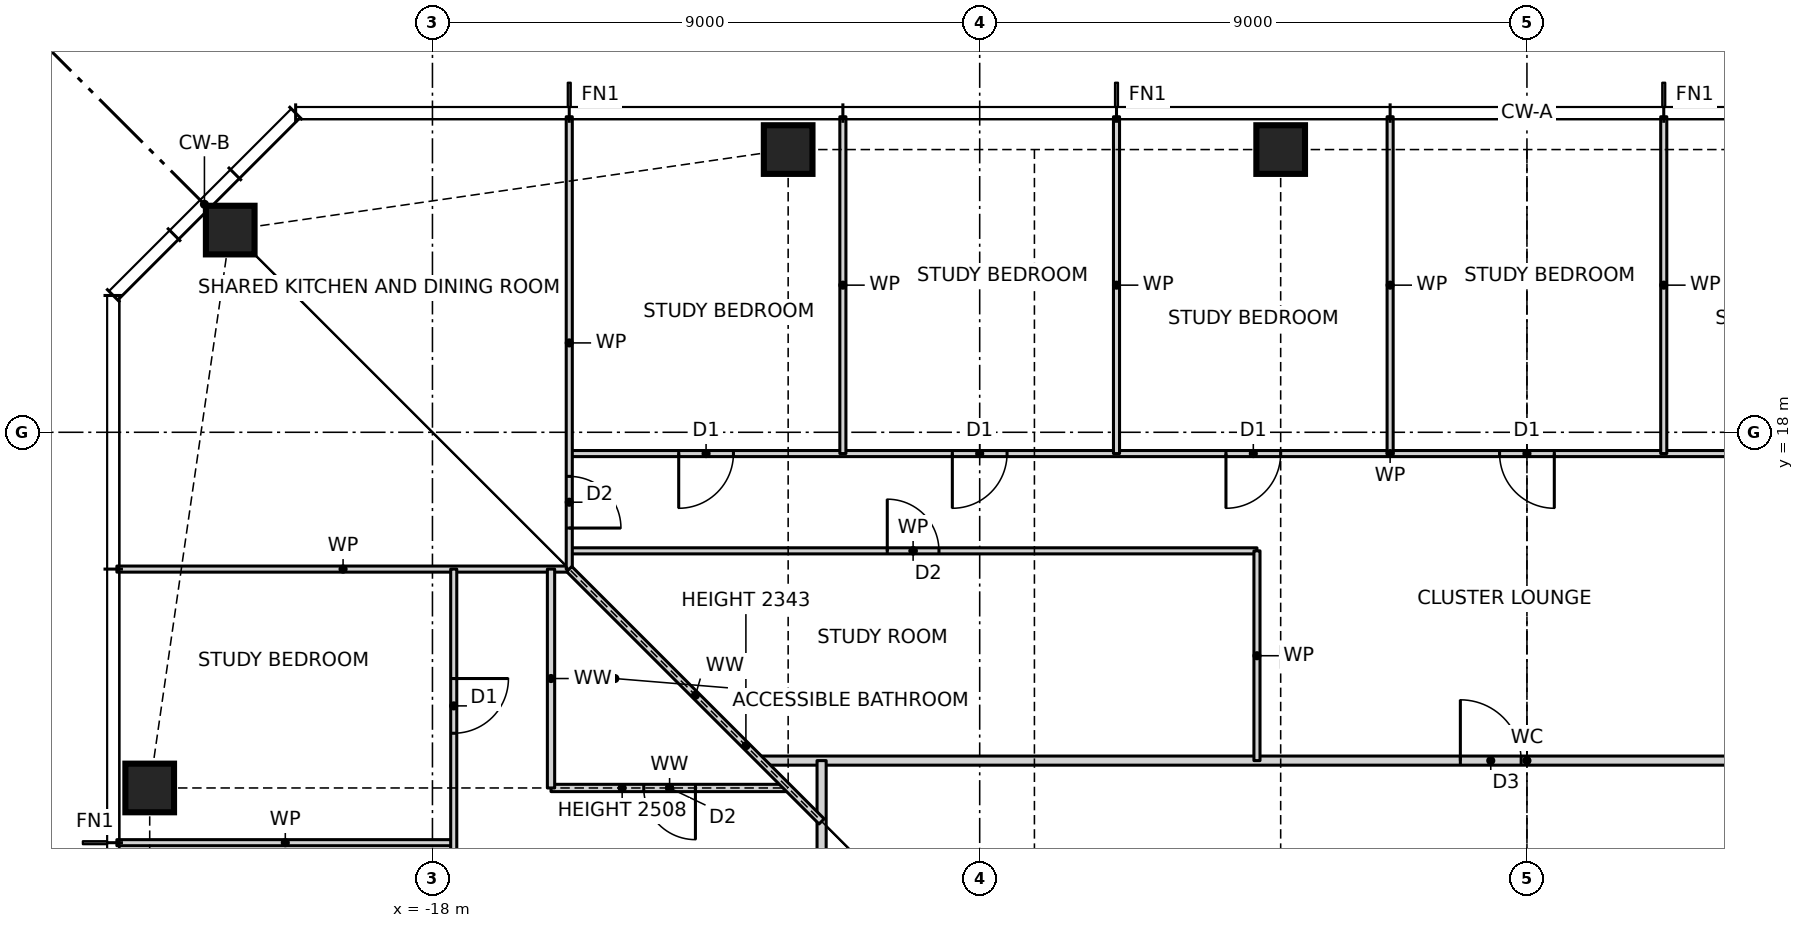
"""IFC4 building model, lengths in metres.
Left out: names, types, materials, properties, quantities, classifications, styles, units other than length and angle.
Written with IfcOpenShell. Run it as: python <this file> out.ifc"""

import sys

from ifc_helpers import new_model, si_unit, direction, frame, frame_2d, origin, origin_2d, place, context, subcontext, project, spatial, rectangle, hollow_rectangle, extrude, element, fill, save


model = new_model("IFC4")
c1 = context("Model", 3, precision=1e-05, world=origin(), true_north=direction((0.0, 1.0)))
c2 = subcontext(c1, "Body", "Model", "MODEL_VIEW")
j1 = project(units=[si_unit("LENGTHUNIT", "METRE"), si_unit("PLANEANGLEUNIT", "RADIAN")], contexts=[c1])
p1 = place(None, origin())
s1 = spatial("IfcSite", under=j1, at=p1, CompositionType="ELEMENT")
p2 = place(p1, origin())
s2 = spatial("IfcBuilding", under=s1, at=p2, CompositionType="ELEMENT")
p3 = place(p2, frame((0.0, 0.0, 60.5)))
s3 = spatial("IfcBuildingStorey", under=s2, at=p3, CompositionType="ELEMENT", Elevation=60.5)
for number, where, z_axis, x_axis in (
    (1, (-4.05, 22.65, 0.0), (0.0, 0.0, 1.0), (1.0, 0.0, 0.0)),
    (2, (-12.15, 22.65, 0.0), (0.0, 0.0, 1.0), (1.0, 0.0, 0.0)),
    (3, (-21.326, 21.326, 0.0), (0.0, 0.0, 1.0), (1.0, 0.0, 0.0)),
    (4, (-22.65, 12.15, 0.0), (0.0, 0.0, 1.0), (1.0, 0.0, 0.0)),
):
    element("IfcColumn", number, at=place(p3, frame(where, z_axis=z_axis, x_axis=x_axis)), inside=s3, PredefinedType="COLUMN", context=c2, shape_type="SweptSolid", body=[
        extrude(hollow_rectangle(XDim=0.8, YDim=0.8, WallThickness=0.09, at=origin_2d()), origin(), (0.0, 0.0, 1.0), 3.5),
    ])
p4 = place(p3, frame((-23.19, 11.25, 0.0), z_axis=(0.0, 0.0, 1.0), x_axis=(1.0, 0.0, 0.0)))
e5 = element("IfcWall", 5, at=p4, inside=s3, PredefinedType="PARTITIONING", context=c2, shape_type="SweptSolid", body=[
    extrude(rectangle(XDim=5.54, YDim=0.1, at=frame_2d((2.77, 0.0))), origin(), (0.0, 0.0, 1.0), 3.27),
])
p5 = place(p3, frame((-16.05, 12.15, 0.0), z_axis=(0.0, 0.0, 1.0), x_axis=(1.0, 0.0, 0.0)))
e6 = element("IfcWall", 6, at=p5, inside=s3, PredefinedType="PARTITIONING", context=c2, shape_type="SweptSolid", body=[
    extrude(rectangle(XDim=3.9, YDim=0.12, at=frame_2d((1.95, 0.0))), origin(), (0.0, 0.0, 1.0), 2.508),
])
p6 = place(p5, frame((1.525, 0.0, 0.0)))
e7 = element("IfcOpeningElement", 7, at=p6, cuts=e6, PredefinedType="OPENING", context=c2, shape_type="SweptSolid", body=[
    extrude(rectangle(XDim=0.85, YDim=2.1, at=frame_2d((0.425, 1.05))), frame((0.0, 0.07, 0.0), z_axis=(0.0, -1.0, 0.0), x_axis=(1.0, 0.0, 0.0)), (0.0, 0.0, 1.0), 0.14),
])
p7 = place(p3, frame((-12.6, 12.6, 0.0), z_axis=(0.0, 0.0, 1.0), x_axis=(1.0, 0.0, 0.0)))
e8 = element("IfcWall", 8, at=p7, inside=s3, PredefinedType="PARTITIONING", context=c2, shape_type="SweptSolid", body=[
    extrude(rectangle(XDim=25.2, YDim=0.15, at=frame_2d((12.6, 0.0))), origin(), (0.0, 0.0, 1.0), 3.27),
])
p8 = place(p7, frame((11.505, 0.0, 0.0)))
e9 = element("IfcOpeningElement", 9, at=p8, cuts=e8, PredefinedType="OPENING", context=c2, shape_type="SweptSolid", body=[
    extrude(rectangle(XDim=1.0, YDim=2.1, at=frame_2d((0.5, 1.05))), frame((0.0, 0.085, 0.0), z_axis=(0.0, -1.0, 0.0), x_axis=(1.0, 0.0, 0.0)), (0.0, 0.0, 1.0), 0.17),
])
p9 = place(p3, frame((-23.19, 15.75, 0.0), z_axis=(0.0, 0.0, 1.0), x_axis=(1.0, 0.0, 0.0)))
e10 = element("IfcWall", 10, at=p9, inside=s3, PredefinedType="PARTITIONING", context=c2, shape_type="SweptSolid", body=[
    extrude(rectangle(XDim=7.44, YDim=0.1, at=frame_2d((3.72, 0.0))), origin(), (0.0, 0.0, 1.0), 3.27),
])
p10 = place(p3, frame((-15.75, 16.05, 0.0), z_axis=(0.0, 0.0, 1.0), x_axis=(1.0, 0.0, 0.0)))
e11 = element("IfcWall", 11, at=p10, inside=s3, PredefinedType="PARTITIONING", context=c2, shape_type="SweptSolid", body=[
    extrude(rectangle(XDim=11.31, YDim=0.1, at=frame_2d((5.655, 0.0))), origin(), (0.0, 0.0, 1.0), 3.27),
])
p11 = place(p10, frame((5.23, 0.0, 0.0)))
e12 = element("IfcOpeningElement", 12, at=p11, cuts=e11, PredefinedType="OPENING", context=c2, shape_type="SweptSolid", body=[
    extrude(rectangle(XDim=0.85, YDim=2.1, at=frame_2d((0.425, 1.05))), frame((0.0, 0.06, 0.0), z_axis=(0.0, -1.0, 0.0), x_axis=(1.0, 0.0, 0.0)), (0.0, 0.0, 1.0), 0.12),
])
p12 = place(p3, frame((-15.75, 17.65, 0.0), z_axis=(0.0, 0.0, 1.0), x_axis=(1.0, 0.0, 0.0)))
e13 = element("IfcWall", 13, at=p12, inside=s3, PredefinedType="PARTITIONING", context=c2, shape_type="SweptSolid", body=[
    extrude(rectangle(XDim=27.0, YDim=0.1, at=frame_2d((13.5, 0.0))), origin(), (0.0, 0.0, 1.0), 3.27),
])
p13 = place(p12, frame((24.3, 0.0, 0.0)))
e14 = element("IfcOpeningElement", 14, at=p13, cuts=e13, PredefinedType="OPENING", context=c2, shape_type="SweptSolid", body=[
    extrude(rectangle(XDim=0.9, YDim=2.1, at=frame_2d((0.45, 1.05))), frame((0.0, 0.06, 0.0), z_axis=(0.0, -1.0, 0.0), x_axis=(1.0, 0.0, 0.0)), (0.0, 0.0, 1.0), 0.12),
])
p14 = place(p12, frame((19.8, 0.0, 0.0)))
e15 = element("IfcOpeningElement", 15, at=p14, cuts=e13, PredefinedType="OPENING", context=c2, shape_type="SweptSolid", body=[
    extrude(rectangle(XDim=0.9, YDim=2.1, at=frame_2d((0.45, 1.05))), frame((0.0, 0.06, 0.0), z_axis=(0.0, -1.0, 0.0), x_axis=(1.0, 0.0, 0.0)), (0.0, 0.0, 1.0), 0.12),
])
p15 = place(p12, frame((15.3, 0.0, 0.0)))
e16 = element("IfcOpeningElement", 16, at=p15, cuts=e13, PredefinedType="OPENING", context=c2, shape_type="SweptSolid", body=[
    extrude(rectangle(XDim=0.9, YDim=2.1, at=frame_2d((0.45, 1.05))), frame((0.0, 0.06, 0.0), z_axis=(0.0, -1.0, 0.0), x_axis=(1.0, 0.0, 0.0)), (0.0, 0.0, 1.0), 0.12),
])
p16 = place(p12, frame((10.8, 0.0, 0.0)))
e17 = element("IfcOpeningElement", 17, at=p16, cuts=e13, PredefinedType="OPENING", context=c2, shape_type="SweptSolid", body=[
    extrude(rectangle(XDim=0.9, YDim=2.1, at=frame_2d((0.45, 1.05))), frame((0.0, 0.06, 0.0), z_axis=(0.0, -1.0, 0.0), x_axis=(1.0, 0.0, 0.0)), (0.0, 0.0, 1.0), 0.12),
])
p17 = place(p12, frame((6.3, 0.0, 0.0)))
e18 = element("IfcOpeningElement", 18, at=p17, cuts=e13, PredefinedType="OPENING", context=c2, shape_type="SweptSolid", body=[
    extrude(rectangle(XDim=0.9, YDim=2.1, at=frame_2d((0.45, 1.05))), frame((0.0, 0.06, 0.0), z_axis=(0.0, -1.0, 0.0), x_axis=(1.0, 0.0, 0.0)), (0.0, 0.0, 1.0), 0.12),
])
p18 = place(p12, frame((1.8, 0.0, 0.0)))
e19 = element("IfcOpeningElement", 19, at=p18, cuts=e13, PredefinedType="OPENING", context=c2, shape_type="SweptSolid", body=[
    extrude(rectangle(XDim=0.9, YDim=2.1, at=frame_2d((0.45, 1.05))), frame((0.0, 0.06, 0.0), z_axis=(0.0, -1.0, 0.0), x_axis=(1.0, 0.0, 0.0)), (0.0, 0.0, 1.0), 0.12),
])
for number, where, z_axis, x_axis in (
    (20, (2.25, 17.65, 0.0), (0.0, 0.0, 1.0), (0.0, 1.0, 0.0)),
    (21, (-2.25, 17.65, 0.0), (0.0, 0.0, 1.0), (0.0, 1.0, 0.0)),
):
    element("IfcWall", number, at=place(p3, frame(where, z_axis=z_axis, x_axis=x_axis)), inside=s3, PredefinedType="PARTITIONING", context=c2, shape_type="SweptSolid", body=[
        extrude(rectangle(XDim=5.54, YDim=0.1, at=frame_2d((2.77, 0.0))), origin(), (0.0, 0.0, 1.0), 3.27),
    ])
p19 = place(p3, frame((-4.44, 12.6, 0.0), z_axis=(0.0, 0.0, 1.0), x_axis=(0.0, 1.0, 0.0)))
e22 = element("IfcWall", 22, at=p19, inside=s3, PredefinedType="PARTITIONING", context=c2, shape_type="SweptSolid", body=[
    extrude(rectangle(XDim=3.45, YDim=0.1, at=frame_2d((1.725, 0.0))), origin(), (0.0, 0.0, 1.0), 3.27),
])
for number, where, z_axis, x_axis in (
    (23, (-6.75, 17.65, 0.0), (0.0, 0.0, 1.0), (0.0, 1.0, 0.0)),
    (24, (-11.25, 17.65, 0.0), (0.0, 0.0, 1.0), (0.0, 1.0, 0.0)),
):
    element("IfcWall", number, at=place(p3, frame(where, z_axis=z_axis, x_axis=x_axis)), inside=s3, PredefinedType="PARTITIONING", context=c2, shape_type="SweptSolid", body=[
        extrude(rectangle(XDim=5.54, YDim=0.1, at=frame_2d((2.77, 0.0))), origin(), (0.0, 0.0, 1.0), 3.27),
    ])
p20 = place(p3, frame((-11.6, -11.6, 0.0), z_axis=(0.0, 0.0, 1.0), x_axis=(0.0, 1.0, 0.0)))
e25 = element("IfcWall", 25, at=p20, inside=s3, PredefinedType="PARTITIONING", context=c2, shape_type="SweptSolid", body=[
    extrude(rectangle(XDim=24.2, YDim=0.15, at=frame_2d((12.1, 0.0))), origin(), (0.0, 0.0, 1.0), 3.27),
])
p21 = place(p20, frame((19.225, 0.0, 0.0)))
e26 = element("IfcOpeningElement", 26, at=p21, cuts=e25, PredefinedType="OPENING", context=c2, shape_type="SweptSolid", body=[
    extrude(rectangle(XDim=1.0, YDim=2.1, at=frame_2d((0.5, 1.05))), frame((0.0, 0.085, 0.0), z_axis=(0.0, -1.0, 0.0), x_axis=(1.0, 0.0, 0.0)), (0.0, 0.0, 1.0), 0.17),
])
p22 = place(p20, frame((3.425, 0.0, 0.0)))
e27 = element("IfcOpeningElement", 27, at=p22, cuts=e25, PredefinedType="OPENING", context=c2, shape_type="SweptSolid", body=[
    extrude(rectangle(XDim=1.0, YDim=2.1, at=frame_2d((0.5, 1.05))), frame((0.0, 0.085, 0.0), z_axis=(0.0, -1.0, 0.0), x_axis=(1.0, 0.0, 0.0)), (0.0, 0.0, 1.0), 0.17),
])
p23 = place(p3, frame((-15.75, 15.75, 0.0), z_axis=(0.0, 0.0, 1.0), x_axis=(0.0, 1.0, 0.0)))
e28 = element("IfcWall", 28, at=p23, inside=s3, PredefinedType="PARTITIONING", context=c2, shape_type="SweptSolid", body=[
    extrude(rectangle(XDim=7.44, YDim=0.1, at=frame_2d((3.72, 0.0))), origin(), (0.0, 0.0, 1.0), 3.27),
])
p24 = place(p23, frame((0.675, 0.0, 0.0)))
e29 = element("IfcOpeningElement", 29, at=p24, cuts=e28, PredefinedType="OPENING", context=c2, shape_type="SweptSolid", body=[
    extrude(rectangle(XDim=0.85, YDim=2.1, at=frame_2d((0.425, 1.05))), frame((0.0, 0.06, 0.0), z_axis=(0.0, -1.0, 0.0), x_axis=(1.0, 0.0, 0.0)), (0.0, 0.0, 1.0), 0.12),
])
p25 = place(p3, frame((-16.05, 12.15, 0.0), z_axis=(0.0, 0.0, 1.0), x_axis=(0.0, 1.0, 0.0)))
e30 = element("IfcWall", 30, at=p25, inside=s3, PredefinedType="PARTITIONING", context=c2, shape_type="SweptSolid", body=[
    extrude(rectangle(XDim=3.6, YDim=0.12, at=frame_2d((1.8, 0.0))), origin(), (0.0, 0.0, 1.0), 3.27),
])
p26 = place(p3, frame((-17.65, -15.75, 0.0), z_axis=(0.0, 0.0, 1.0), x_axis=(0.0, 1.0, 0.0)))
e31 = element("IfcWall", 31, at=p26, inside=s3, PredefinedType="PARTITIONING", context=c2, shape_type="SweptSolid", body=[
    extrude(rectangle(XDim=31.5, YDim=0.1, at=frame_2d((15.75, 0.0))), origin(), (0.0, 0.0, 1.0), 3.27),
])
p27 = place(p26, frame((28.8, 0.0, 0.0)))
e32 = element("IfcOpeningElement", 32, at=p27, cuts=e31, PredefinedType="OPENING", context=c2, shape_type="SweptSolid", body=[
    extrude(rectangle(XDim=0.9, YDim=2.1, at=frame_2d((0.45, 1.05))), frame((0.0, 0.06, 0.0), z_axis=(0.0, -1.0, 0.0), x_axis=(1.0, 0.0, 0.0)), (0.0, 0.0, 1.0), 0.12),
])
p28 = place(p26, frame((24.3, 0.0, 0.0)))
e33 = element("IfcOpeningElement", 33, at=p28, cuts=e31, PredefinedType="OPENING", context=c2, shape_type="SweptSolid", body=[
    extrude(rectangle(XDim=0.9, YDim=2.1, at=frame_2d((0.45, 1.05))), frame((0.0, 0.06, 0.0), z_axis=(0.0, -1.0, 0.0), x_axis=(1.0, 0.0, 0.0)), (0.0, 0.0, 1.0), 0.12),
])
p29 = place(p26, frame((19.8, 0.0, 0.0)))
e34 = element("IfcOpeningElement", 34, at=p29, cuts=e31, PredefinedType="OPENING", context=c2, shape_type="SweptSolid", body=[
    extrude(rectangle(XDim=0.9, YDim=2.1, at=frame_2d((0.45, 1.05))), frame((0.0, 0.06, 0.0), z_axis=(0.0, -1.0, 0.0), x_axis=(1.0, 0.0, 0.0)), (0.0, 0.0, 1.0), 0.12),
])
p30 = place(p26, frame((15.3, 0.0, 0.0)))
e35 = element("IfcOpeningElement", 35, at=p30, cuts=e31, PredefinedType="OPENING", context=c2, shape_type="SweptSolid", body=[
    extrude(rectangle(XDim=0.9, YDim=2.1, at=frame_2d((0.45, 1.05))), frame((0.0, 0.06, 0.0), z_axis=(0.0, -1.0, 0.0), x_axis=(1.0, 0.0, 0.0)), (0.0, 0.0, 1.0), 0.12),
])
p31 = place(p26, frame((10.8, 0.0, 0.0)))
e36 = element("IfcOpeningElement", 36, at=p31, cuts=e31, PredefinedType="OPENING", context=c2, shape_type="SweptSolid", body=[
    extrude(rectangle(XDim=0.9, YDim=2.1, at=frame_2d((0.45, 1.05))), frame((0.0, 0.06, 0.0), z_axis=(0.0, -1.0, 0.0), x_axis=(1.0, 0.0, 0.0)), (0.0, 0.0, 1.0), 0.12),
])
p32 = place(p26, frame((6.3, 0.0, 0.0)))
e37 = element("IfcOpeningElement", 37, at=p32, cuts=e31, PredefinedType="OPENING", context=c2, shape_type="SweptSolid", body=[
    extrude(rectangle(XDim=0.9, YDim=2.1, at=frame_2d((0.45, 1.05))), frame((0.0, 0.06, 0.0), z_axis=(0.0, -1.0, 0.0), x_axis=(1.0, 0.0, 0.0)), (0.0, 0.0, 1.0), 0.12),
])
p33 = place(p26, frame((1.8, 0.0, 0.0)))
e38 = element("IfcOpeningElement", 38, at=p33, cuts=e31, PredefinedType="OPENING", context=c2, shape_type="SweptSolid", body=[
    extrude(rectangle(XDim=0.9, YDim=2.1, at=frame_2d((0.45, 1.05))), frame((0.0, 0.06, 0.0), z_axis=(0.0, -1.0, 0.0), x_axis=(1.0, 0.0, 0.0)), (0.0, 0.0, 1.0), 0.12),
])
p34 = place(p3, frame((-11.6, 11.6, 0.0), z_axis=(0.0, 0.0, 1.0), x_axis=(-0.707106781187, 0.707106781187, 0.0)))
e39 = element("IfcWall", 39, at=p34, inside=s3, PredefinedType="PARTITIONING", context=c2, shape_type="SweptSolid", body=[
    extrude(rectangle(XDim=5.869, YDim=0.12, at=frame_2d((2.935, 0.0))), origin(), (0.0, 0.0, 1.0), 2.343),
])
p35 = place(p15, frame((0.9, 0.0, 0.0), z_axis=(0.0, 0.0, 1.0), x_axis=(-1.0, 0.0, 0.0)))
e40 = element("IfcDoor", 40, at=p35, inside=s3, OperationType="SINGLE_SWING_LEFT", PredefinedType="DOOR", context=c2, shape_type="SweptSolid", body=[
    extrude(rectangle(XDim=0.9, YDim=2.1, at=frame_2d((0.45, 1.05))), frame((0.0, 0.025, 0.0), z_axis=(0.0, -1.0, 0.0), x_axis=(1.0, 0.0, 0.0)), (0.0, 0.0, 1.0), 0.05),
])
fill(e16, e40)
p36 = place(p16, frame((0.9, 0.0, 0.0), z_axis=(0.0, 0.0, 1.0), x_axis=(-1.0, 0.0, 0.0)))
e41 = element("IfcDoor", 41, at=p36, inside=s3, OperationType="SINGLE_SWING_RIGHT", PredefinedType="DOOR", context=c2, shape_type="SweptSolid", body=[
    extrude(rectangle(XDim=0.9, YDim=2.1, at=frame_2d((0.45, 1.05))), frame((0.0, 0.025, 0.0), z_axis=(0.0, -1.0, 0.0), x_axis=(1.0, 0.0, 0.0)), (0.0, 0.0, 1.0), 0.05),
])
fill(e17, e41)
p37 = place(p17, frame((0.9, 0.0, 0.0), z_axis=(0.0, 0.0, 1.0), x_axis=(-1.0, 0.0, 0.0)))
e42 = element("IfcDoor", 42, at=p37, inside=s3, OperationType="SINGLE_SWING_RIGHT", PredefinedType="DOOR", context=c2, shape_type="SweptSolid", body=[
    extrude(rectangle(XDim=0.9, YDim=2.1, at=frame_2d((0.45, 1.05))), frame((0.0, 0.025, 0.0), z_axis=(0.0, -1.0, 0.0), x_axis=(1.0, 0.0, 0.0)), (0.0, 0.0, 1.0), 0.05),
])
fill(e18, e42)
p38 = place(p18, frame((0.9, 0.0, 0.0), z_axis=(0.0, 0.0, 1.0), x_axis=(-1.0, 0.0, 0.0)))
e43 = element("IfcDoor", 43, at=p38, inside=s3, OperationType="SINGLE_SWING_RIGHT", PredefinedType="DOOR", context=c2, shape_type="SweptSolid", body=[
    extrude(rectangle(XDim=0.9, YDim=2.1, at=frame_2d((0.45, 1.05))), frame((0.0, 0.025, 0.0), z_axis=(0.0, -1.0, 0.0), x_axis=(1.0, 0.0, 0.0)), (0.0, 0.0, 1.0), 0.05),
])
fill(e19, e43)
p39 = place(p8, origin())
e44 = element("IfcDoor", 44, at=p39, inside=s3, OperationType="SINGLE_SWING_LEFT", PredefinedType="DOOR", context=c2, shape_type="SweptSolid", body=[
    extrude(rectangle(XDim=1.0, YDim=2.1, at=frame_2d((0.5, 1.05))), frame((0.0, 0.025, 0.0), z_axis=(0.0, -1.0, 0.0), x_axis=(1.0, 0.0, 0.0)), (0.0, 0.0, 1.0), 0.05),
])
fill(e9, e44)
p40 = place(p11, origin())
e45 = element("IfcDoor", 45, at=p40, inside=s3, OperationType="SINGLE_SWING_LEFT", PredefinedType="DOOR", context=c2, shape_type="SweptSolid", body=[
    extrude(rectangle(XDim=0.85, YDim=2.1, at=frame_2d((0.425, 1.05))), frame((0.0, 0.025, 0.0), z_axis=(0.0, -1.0, 0.0), x_axis=(1.0, 0.0, 0.0)), (0.0, 0.0, 1.0), 0.05),
])
fill(e12, e45)
p41 = place(p27, frame((0.9, 0.0, 0.0), z_axis=(0.0, 0.0, 1.0), x_axis=(-1.0, 0.0, 0.0)))
e46 = element("IfcDoor", 46, at=p41, inside=s3, OperationType="SINGLE_SWING_LEFT", PredefinedType="DOOR", context=c2, shape_type="SweptSolid", body=[
    extrude(rectangle(XDim=0.9, YDim=2.1, at=frame_2d((0.45, 1.05))), frame((0.0, 0.025, 0.0), z_axis=(0.0, -1.0, 0.0), x_axis=(1.0, 0.0, 0.0)), (0.0, 0.0, 1.0), 0.05),
])
fill(e32, e46)
p42 = place(p6, frame((0.85, 0.0, 0.0), z_axis=(0.0, 0.0, 1.0), x_axis=(-1.0, 0.0, 0.0)))
e47 = element("IfcDoor", 47, at=p42, inside=s3, OperationType="SINGLE_SWING_LEFT", PredefinedType="DOOR", context=c2, shape_type="SweptSolid", body=[
    extrude(rectangle(XDim=0.85, YDim=2.1, at=frame_2d((0.425, 1.05))), frame((0.0, 0.025, 0.0), z_axis=(0.0, -1.0, 0.0), x_axis=(1.0, 0.0, 0.0)), (0.0, 0.0, 1.0), 0.05),
])
fill(e7, e47)
p43 = place(p24, frame((0.85, 0.0, 0.0), z_axis=(0.0, 0.0, 1.0), x_axis=(-1.0, 0.0, 0.0)))
e48 = element("IfcDoor", 48, at=p43, inside=s3, OperationType="SINGLE_SWING_RIGHT", PredefinedType="DOOR", context=c2, shape_type="SweptSolid", body=[
    extrude(rectangle(XDim=0.85, YDim=2.1, at=frame_2d((0.425, 1.05))), frame((0.0, 0.025, 0.0), z_axis=(0.0, -1.0, 0.0), x_axis=(1.0, 0.0, 0.0)), (0.0, 0.0, 1.0), 0.05),
])
fill(e29, e48)
save(model, sys.argv[1])
